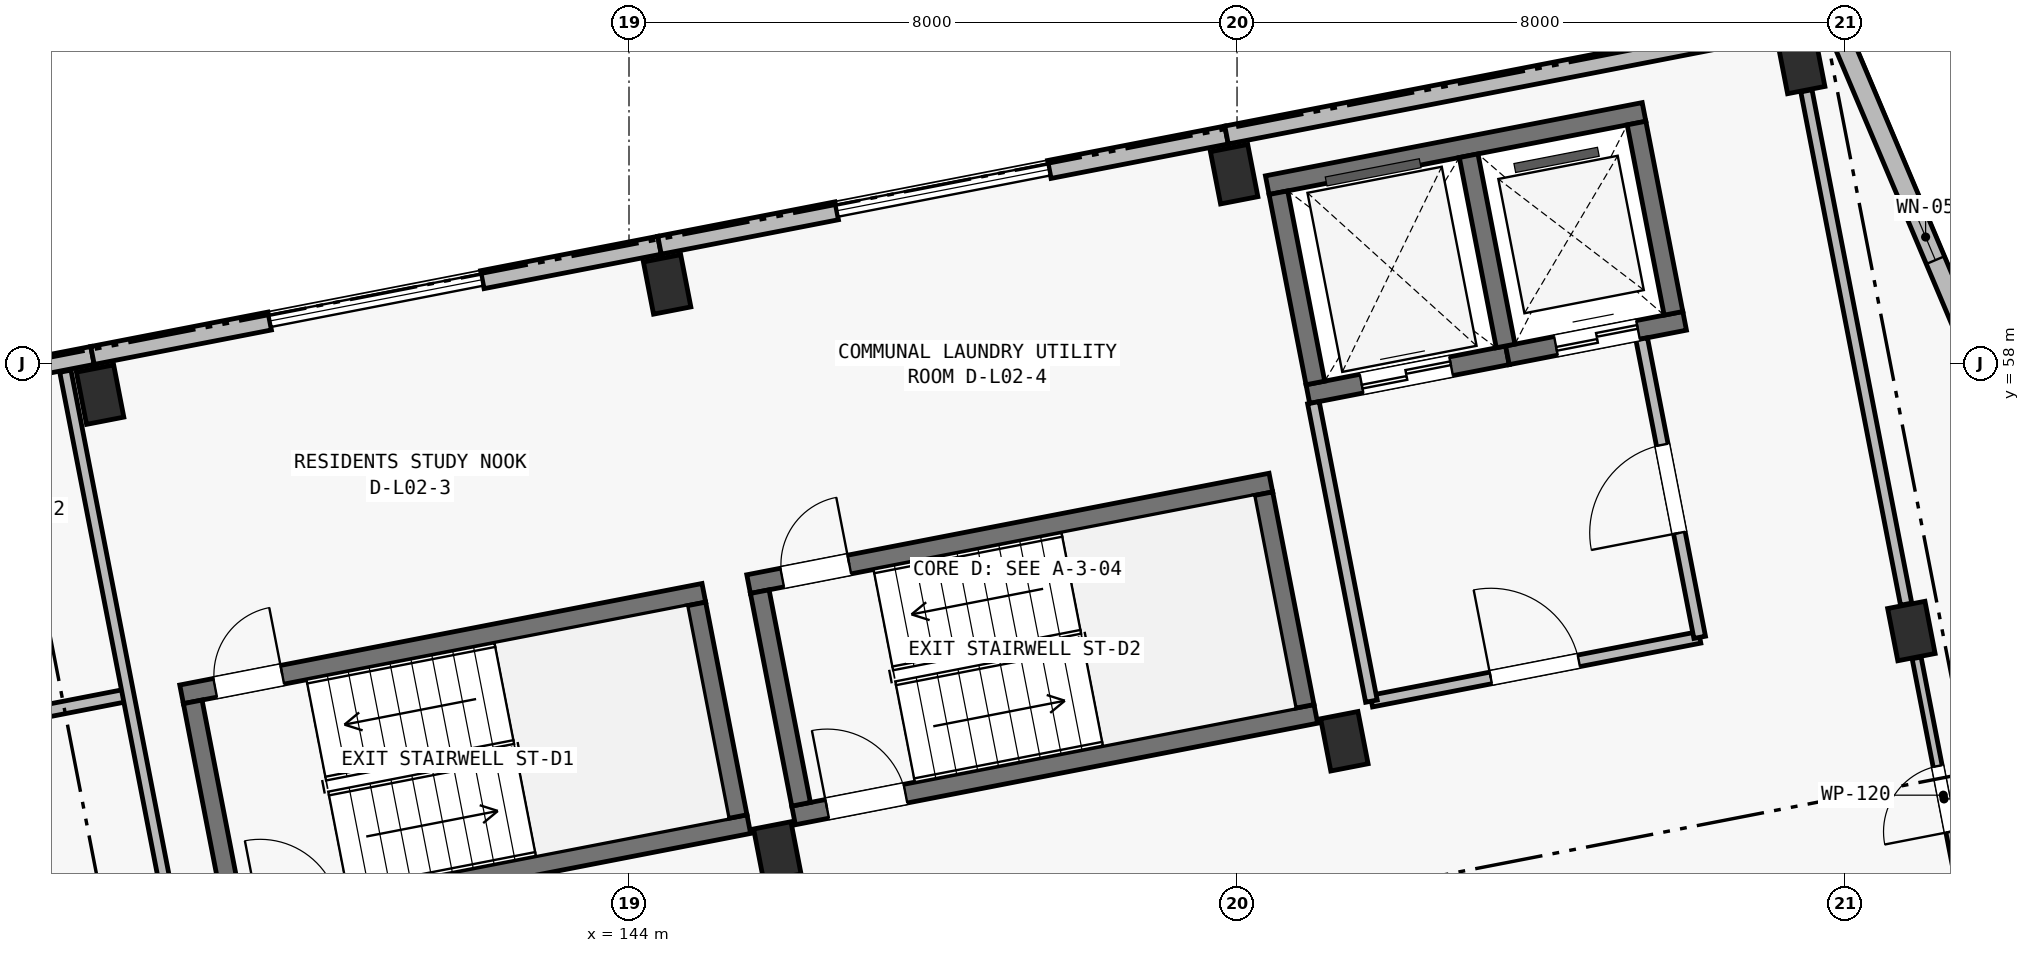
"""IFC4 building model, lengths in metres.
Left out: names, types, materials, properties, quantities, classifications, styles, units other than length and angle.
Written with IfcOpenShell. Run it as: python <this file> out.ifc"""

import sys

from ifc_helpers import new_model, si_unit, direction, frame, frame_2d, origin, origin_2d, place, context, subcontext, project, spatial, rectangle, extrude, element, fill, save


model = new_model("IFC4")
c1 = context("Model", 3, precision=1e-05, world=origin(), true_north=direction((0.0, 1.0)))
c2 = subcontext(c1, "Body", "Model", "MODEL_VIEW")
j1 = project(units=[si_unit("LENGTHUNIT", "METRE"), si_unit("PLANEANGLEUNIT", "RADIAN")], contexts=[c1])
p1 = place(None, origin())
s1 = spatial("IfcSite", under=j1, at=p1, CompositionType="ELEMENT")
p2 = place(p1, origin())
s2 = spatial("IfcBuilding", under=s1, at=p2, CompositionType="ELEMENT")
p3 = place(p2, frame((0.0, 0.0, 8.4)))
s3 = spatial("IfcBuildingStorey", under=s2, at=p3, CompositionType="ELEMENT", Elevation=8.4)
for number, where, z_axis, x_axis in (
    (1, (137.041, 57.59, 0.0), (0.0, 0.0, 1.0), (0.982, 0.191, 0.0)),
    (2, (145.952, 51.58, 0.0), (0.0, 0.0, 1.0), (0.982, 0.191, 0.0)),
    (3, (144.502, 59.041, 0.0), (0.0, 0.0, 1.0), (0.982, 0.191, 0.0)),
    (4, (153.412, 53.03, 0.0), (0.0, 0.0, 1.0), (0.982, 0.191, 0.0)),
    (5, (151.962, 60.491, 0.0), (0.0, 0.0, 1.0), (0.982, 0.191, 0.0)),
    (6, (160.873, 54.48, 0.0), (0.0, 0.0, 1.0), (0.982, 0.191, 0.0)),
    (7, (159.422, 61.941, 0.0), (0.0, 0.0, 1.0), (0.982, 0.191, 0.0)),
):
    element("IfcColumn", number, at=place(p3, frame(where, z_axis=z_axis, x_axis=x_axis)), inside=s3, PredefinedType="COLUMN", context=c2, shape_type="SweptSolid", body=[
        extrude(rectangle(XDim=0.5, YDim=0.7, at=origin_2d()), origin(), (0.0, 0.0, 1.0), 3.25),
    ])
p4 = place(p3, frame((152.397, 60.346, 0.0), z_axis=(0.0, 0.0, 1.0), x_axis=(0.981635261308, 0.190767433692, 0.0)))
e8 = element("IfcWall", 8, at=p4, inside=s3, PredefinedType="SHEAR", context=c2, shape_type="SweptSolid", body=[
    extrude(rectangle(XDim=5.05, YDim=0.25, at=frame_2d((2.525, 0.0))), origin(), (0.0, 0.0, 1.0), 3.25),
])
p5 = place(p3, frame((152.932, 57.598, 0.0), z_axis=(0.0, 0.0, 1.0), x_axis=(0.981636759622, 0.190759723627, 0.0)))
e9 = element("IfcWall", 9, at=p5, inside=s3, PredefinedType="SHEAR", context=c2, shape_type="SweptSolid", body=[
    extrude(rectangle(XDim=2.675, YDim=0.25, at=frame_2d((1.337, 0.0))), origin(), (0.0, 0.0, 1.0), 3.25),
])
p6 = place(p5, frame((0.72, 0.0, 0.0)))
e10 = element("IfcOpeningElement", 10, at=p6, cuts=e9, PredefinedType="OPENING", context=c2, shape_type="SweptSolid", body=[
    extrude(rectangle(XDim=1.2, YDim=2.2, at=frame_2d((0.6, 1.1))), frame((0.0, 0.14, 0.0), z_axis=(0.0, -1.0, 0.0), x_axis=(1.0, 0.0, 0.0)), (0.0, 0.0, 1.0), 0.28),
])
p7 = place(p3, frame((155.558, 58.108, 0.0), z_axis=(0.0, 0.0, 1.0), x_axis=(0.981633573872, 0.190776116556, 0.0)))
e11 = element("IfcWall", 11, at=p7, inside=s3, PredefinedType="SHEAR", context=c2, shape_type="SweptSolid", body=[
    extrude(rectangle(XDim=2.375, YDim=0.25, at=frame_2d((1.188, 0.0))), origin(), (0.0, 0.0, 1.0), 3.25),
])
p8 = place(p7, frame((0.65, 0.0, 0.0)))
e12 = element("IfcOpeningElement", 12, at=p8, cuts=e11, PredefinedType="OPENING", context=c2, shape_type="SweptSolid", body=[
    extrude(rectangle(XDim=1.1, YDim=2.15, at=frame_2d((0.55, 1.075))), frame((0.0, 0.14, 0.0), z_axis=(0.0, -1.0, 0.0), x_axis=(1.0, 0.0, 0.0)), (0.0, 0.0, 1.0), 0.28),
])
for number, where, z_axis, x_axis in (
    (13, (153.031, 57.744, 0.0), (0.0, 0.0, 1.0), (-0.191, 0.982, 0.0)),
    (14, (155.534, 58.231, 0.0), (0.0, 0.0, 1.0), (-0.191, 0.982, 0.0)),
    (15, (157.742, 58.66, 0.0), (0.0, 0.0, 1.0), (-0.191, 0.982, 0.0)),
):
    element("IfcWall", number, at=place(p3, frame(where, z_axis=z_axis, x_axis=x_axis)), inside=s3, PredefinedType="SHEAR", context=c2, shape_type="SweptSolid", body=[
        extrude(rectangle(XDim=2.55, YDim=0.25, at=frame_2d((1.275, 0.0))), origin(), (0.0, 0.0, 1.0), 3.25),
    ])
p9 = place(p3, frame((138.113, 53.647, 0.0), z_axis=(0.0, 0.0, 1.0), x_axis=(0.981626097708, 0.19081458094, 0.0)))
e16 = element("IfcWall", 16, at=p9, inside=s3, PredefinedType="SHEAR", context=c2, shape_type="SweptSolid", body=[
    extrude(rectangle(XDim=7.0, YDim=0.25, at=frame_2d((3.5, 0.0))), origin(), (0.0, 0.0, 1.0), 3.25),
])
p10 = place(p9, frame((0.45, 0.0, 0.0)))
e17 = element("IfcOpeningElement", 17, at=p10, cuts=e16, PredefinedType="OPENING", context=c2, shape_type="SweptSolid", body=[
    extrude(rectangle(XDim=0.9, YDim=2.1, at=frame_2d((0.45, 1.05))), frame((0.0, 0.14, 0.0), z_axis=(0.0, -1.0, 0.0), x_axis=(1.0, 0.0, 0.0)), (0.0, 0.0, 1.0), 0.28),
])
p11 = place(p3, frame((138.705, 50.604, 0.0), z_axis=(0.0, 0.0, 1.0), x_axis=(0.981626097708, 0.19081458094, 0.0)))
e18 = element("IfcWall", 18, at=p11, inside=s3, PredefinedType="SHEAR", context=c2, shape_type="SweptSolid", body=[
    extrude(rectangle(XDim=7.0, YDim=0.25, at=frame_2d((3.5, 0.0))), origin(), (0.0, 0.0, 1.0), 3.25),
])
p12 = place(p11, frame((0.45, 0.0, 0.0)))
e19 = element("IfcOpeningElement", 19, at=p12, cuts=e18, PredefinedType="OPENING", context=c2, shape_type="SweptSolid", body=[
    extrude(rectangle(XDim=1.05, YDim=2.15, at=frame_2d((0.525, 1.075))), frame((0.0, 0.14, 0.0), z_axis=(0.0, -1.0, 0.0), x_axis=(1.0, 0.0, 0.0)), (0.0, 0.0, 1.0), 0.28),
])
p13 = place(p3, frame((138.804, 50.751, 0.0), z_axis=(0.0, 0.0, 1.0), x_axis=(-0.190858194834, 0.981617618762, 0.0)))
e20 = element("IfcWall", 20, at=p13, inside=s3, PredefinedType="SHEAR", context=c2, shape_type="SweptSolid", body=[
    extrude(rectangle(XDim=2.85, YDim=0.25, at=frame_2d((1.425, 0.0))), origin(), (0.0, 0.0, 1.0), 3.25),
])
p14 = place(p3, frame((145.43, 52.039, 0.0), z_axis=(0.0, 0.0, 1.0), x_axis=(-0.190842147128, 0.981620738819, 0.0)))
e21 = element("IfcWall", 21, at=p14, inside=s3, PredefinedType="SHEAR", context=c2, shape_type="SweptSolid", body=[
    extrude(rectangle(XDim=2.85, YDim=0.25, at=frame_2d((1.425, 0.0))), origin(), (0.0, 0.0, 1.0), 3.25),
])
p15 = place(p3, frame((145.574, 55.098, 0.0), z_axis=(0.0, 0.0, 1.0), x_axis=(0.981626097708, 0.19081458094, 0.0)))
e22 = element("IfcWall", 22, at=p15, inside=s3, PredefinedType="SHEAR", context=c2, shape_type="SweptSolid", body=[
    extrude(rectangle(XDim=7.0, YDim=0.25, at=frame_2d((3.5, 0.0))), origin(), (0.0, 0.0, 1.0), 3.25),
])
p16 = place(p15, frame((0.45, 0.0, 0.0)))
e23 = element("IfcOpeningElement", 23, at=p16, cuts=e22, PredefinedType="OPENING", context=c2, shape_type="SweptSolid", body=[
    extrude(rectangle(XDim=0.9, YDim=2.1, at=frame_2d((0.45, 1.05))), frame((0.0, 0.14, 0.0), z_axis=(0.0, -1.0, 0.0), x_axis=(1.0, 0.0, 0.0)), (0.0, 0.0, 1.0), 0.28),
])
p17 = place(p3, frame((146.165, 52.054, 0.0), z_axis=(0.0, 0.0, 1.0), x_axis=(0.981627367538, 0.190808048312, 0.0)))
e24 = element("IfcWall", 24, at=p17, inside=s3, PredefinedType="SHEAR", context=c2, shape_type="SweptSolid", body=[
    extrude(rectangle(XDim=7.0, YDim=0.25, at=frame_2d((3.5, 0.0))), origin(), (0.0, 0.0, 1.0), 3.25),
])
p18 = place(p17, frame((0.45, 0.0, 0.0)))
e25 = element("IfcOpeningElement", 25, at=p18, cuts=e24, PredefinedType="OPENING", context=c2, shape_type="SweptSolid", body=[
    extrude(rectangle(XDim=1.05, YDim=2.15, at=frame_2d((0.525, 1.075))), frame((0.0, 0.14, 0.0), z_axis=(0.0, -1.0, 0.0), x_axis=(1.0, 0.0, 0.0)), (0.0, 0.0, 1.0), 0.28),
])
for number, where, z_axis, x_axis in (
    (26, (146.264, 52.201, 0.0), (0.0, 0.0, 1.0), (-0.191, 0.982, 0.0)),
    (27, (152.89, 53.489, 0.0), (0.0, 0.0, 1.0), (-0.191, 0.982, 0.0)),
):
    element("IfcWall", number, at=place(p3, frame(where, z_axis=z_axis, x_axis=x_axis)), inside=s3, PredefinedType="SHEAR", context=c2, shape_type="SweptSolid", body=[
        extrude(rectangle(XDim=2.85, YDim=0.25, at=frame_2d((1.425, 0.0))), origin(), (0.0, 0.0, 1.0), 3.25),
    ])
p19 = place(p3, frame((129.481, 56.656, 0.0), z_axis=(0.0, 0.0, 1.0), x_axis=(0.981626422232, 0.190812911449, 0.0)))
e28 = element("IfcWall", 28, at=p19, inside=s3, PredefinedType="SOLIDWALL", context=c2, shape_type="SweptSolid", body=[
    extrude(rectangle(XDim=7.6, YDim=0.24, at=frame_2d((3.8, 0.0))), origin(), (0.0, 0.0, 1.0), 3.0),
])
p20 = place(p19, frame((0.934, 0.0, 0.44)))
e29 = element("IfcOpeningElement", 29, at=p20, cuts=e28, PredefinedType="OPENING", context=c2, shape_type="SweptSolid", body=[
    extrude(rectangle(XDim=0.62, YDim=2.28, at=frame_2d((0.31, 1.14))), frame((0.0, 0.135, 0.0), z_axis=(0.0, -1.0, 0.0), x_axis=(1.0, 0.0, 0.0)), (0.0, 0.0, 1.0), 0.27),
])
p21 = place(p19, frame((5.506, 0.0, 0.5)))
e30 = element("IfcOpeningElement", 30, at=p21, cuts=e28, PredefinedType="OPENING", context=c2, shape_type="SweptSolid", body=[
    extrude(rectangle(XDim=0.7, YDim=2.36, at=frame_2d((0.35, 1.18))), frame((0.0, 0.135, 0.0), z_axis=(0.0, -1.0, 0.0), x_axis=(1.0, 0.0, 0.0)), (0.0, 0.0, 1.0), 0.27),
])
for number, where, z_axis, x_axis in (
    (31, (136.941, 58.106, 0.0), (0.0, 0.0, 1.0), (0.982, 0.191, 0.0)),
    (32, (142.07, 59.103, 0.0), (0.0, 0.0, 1.0), (0.982, 0.191, 0.0)),
):
    element("IfcWall", number, at=place(p3, frame(where, z_axis=z_axis, x_axis=x_axis)), inside=s3, PredefinedType="SOLIDWALL", context=c2, shape_type="SweptSolid", body=[
        extrude(rectangle(XDim=2.375, YDim=0.24, at=frame_2d((1.188, 0.0))), origin(), (0.0, 0.0, 1.0), 3.0),
    ])
p22 = place(p3, frame((144.401, 59.556, 0.0), z_axis=(0.0, 0.0, 1.0), x_axis=(0.981633573872, 0.190776116556, 0.0)))
e33 = element("IfcWall", 33, at=p22, inside=s3, PredefinedType="SOLIDWALL", context=c2, shape_type="SweptSolid", body=[
    extrude(rectangle(XDim=2.375, YDim=0.24, at=frame_2d((1.188, 0.0))), origin(), (0.0, 0.0, 1.0), 3.0),
])
p23 = place(p3, frame((149.531, 60.553, 0.0), z_axis=(0.0, 0.0, 1.0), x_axis=(0.98161057432, 0.190894422087, 0.0)))
e34 = element("IfcWall", 34, at=p23, inside=s3, PredefinedType="SOLIDWALL", context=c2, shape_type="SweptSolid", body=[
    extrude(rectangle(XDim=2.375, YDim=0.24, at=frame_2d((1.188, 0.0))), origin(), (0.0, 0.0, 1.0), 3.0),
])
p24 = place(p3, frame((151.862, 61.006, 0.0), z_axis=(0.0, 0.0, 1.0), x_axis=(0.981627273155, 0.190808533872, 0.0)))
e35 = element("IfcWall", 35, at=p24, inside=s3, PredefinedType="SOLIDWALL", context=c2, shape_type="SweptSolid", body=[
    extrude(rectangle(XDim=8.125, YDim=0.24, at=frame_2d((4.062, 0.0))), origin(), (0.0, 0.0, 1.0), 3.0),
])
p25 = place(p24, frame((6.525, 0.0, 0.45)))
e36 = element("IfcOpeningElement", 36, at=p25, cuts=e35, PredefinedType="OPENING", context=c2, shape_type="SweptSolid", body=[
    extrude(rectangle(XDim=0.75, YDim=2.32, at=frame_2d((0.375, 1.16))), frame((0.0, 0.135, 0.0), z_axis=(0.0, -1.0, 0.0), x_axis=(1.0, 0.0, 0.0)), (0.0, 0.0, 1.0), 0.27),
])
p26 = place(p3, frame((159.837, 62.556, 0.0), z_axis=(0.0, 0.0, 1.0), x_axis=(0.389225507936, -0.921142499276, 0.0)))
e37 = element("IfcWall", 37, at=p26, inside=s3, PredefinedType="SOLIDWALL", context=c2, shape_type="SweptSolid", body=[
    extrude(rectangle(XDim=17.91, YDim=0.26, at=frame_2d((8.955, 0.0))), origin(), (0.0, 0.0, 1.0), 3.0),
])
p27 = place(p26, frame((2.81, 0.0, 0.45)))
e38 = element("IfcOpeningElement", 38, at=p27, cuts=e37, PredefinedType="OPENING", context=c2, shape_type="SweptSolid", body=[
    extrude(rectangle(XDim=0.66, YDim=2.32, at=frame_2d((0.33, 1.16))), frame((0.0, 0.145, 0.0), z_axis=(0.0, -1.0, 0.0), x_axis=(1.0, 0.0, 0.0)), (0.0, 0.0, 1.0), 0.29),
])
p28 = place(p26, frame((14.3, 0.0, 0.52)))
e39 = element("IfcOpeningElement", 39, at=p28, cuts=e37, PredefinedType="OPENING", context=c2, shape_type="SweptSolid", body=[
    extrude(rectangle(XDim=0.8, YDim=2.3, at=frame_2d((0.4, 1.15))), frame((0.0, 0.145, 0.0), z_axis=(0.0, -1.0, 0.0), x_axis=(1.0, 0.0, 0.0)), (0.0, 0.0, 1.0), 0.29),
])
p29 = place(p3, frame((153.768, 53.558, 0.0), z_axis=(0.0, 0.0, 1.0), x_axis=(0.981624918225, 0.190820648566, 0.0)))
e40 = element("IfcWall", 40, at=p29, inside=s3, PredefinedType="PARTITIONING", context=c2, shape_type="SweptSolid", body=[
    extrude(rectangle(XDim=4.4, YDim=0.155, at=frame_2d((2.2, 0.0))), origin(), (0.0, 0.0, 1.0), 2.97),
])
p30 = place(p29, frame((1.6, 0.0, 0.0)))
e41 = element("IfcOpeningElement", 41, at=p30, cuts=e40, PredefinedType="OPENING", context=c2, shape_type="SweptSolid", body=[
    extrude(rectangle(XDim=1.18, YDim=2.15, at=frame_2d((0.59, 1.075))), frame((0.0, 0.093, 0.0), z_axis=(0.0, -1.0, 0.0), x_axis=(1.0, 0.0, 0.0)), (0.0, 0.0, 1.0), 0.185),
])
p31 = place(p3, frame((153.768, 53.558, 0.0), z_axis=(0.0, 0.0, 1.0), x_axis=(-0.19085495634, 0.981618248425, 0.0)))
e42 = element("IfcWall", 42, at=p31, inside=s3, PredefinedType="PARTITIONING", context=c2, shape_type="SweptSolid", body=[
    extrude(rectangle(XDim=4.0, YDim=0.155, at=frame_2d((2.0, 0.0))), origin(), (0.0, 0.0, 1.0), 2.97),
])
p32 = place(p3, frame((158.087, 54.397, 0.0), z_axis=(0.0, 0.0, 1.0), x_axis=(-0.190796144009, 0.981629681413, 0.0)))
e43 = element("IfcWall", 43, at=p32, inside=s3, PredefinedType="PARTITIONING", context=c2, shape_type="SweptSolid", body=[
    extrude(rectangle(XDim=4.0, YDim=0.155, at=frame_2d((2.0, 0.0))), origin(), (0.0, 0.0, 1.0), 2.97),
])
p33 = place(p32, frame((1.4, 0.0, 0.0)))
e44 = element("IfcOpeningElement", 44, at=p33, cuts=e43, PredefinedType="OPENING", context=c2, shape_type="SweptSolid", body=[
    extrude(rectangle(XDim=1.18, YDim=2.15, at=frame_2d((0.59, 1.075))), frame((0.0, 0.093, 0.0), z_axis=(0.0, -1.0, 0.0), x_axis=(1.0, 0.0, 0.0)), (0.0, 0.0, 1.0), 0.185),
])
p34 = place(p3, frame((161.643, 50.515, 0.0), z_axis=(0.0, 0.0, 1.0), x_axis=(-0.190805731561, 0.981627817864, 0.0)))
e45 = element("IfcWall", 45, at=p34, inside=s3, PredefinedType="PARTITIONING", context=c2, shape_type="SweptSolid", body=[
    extrude(rectangle(XDim=3.68, YDim=0.12, at=frame_2d((1.84, 0.0))), origin(), (0.0, 0.0, 1.0), 2.5),
])
p35 = place(p34, frame((1.35, 0.0, 0.0)))
e46 = element("IfcOpeningElement", 46, at=p35, cuts=e45, PredefinedType="OPENING", context=c2, shape_type="SweptSolid", body=[
    extrude(rectangle(XDim=0.88, YDim=2.1, at=frame_2d((0.44, 1.05))), frame((0.0, 0.075, 0.0), z_axis=(0.0, -1.0, 0.0), x_axis=(1.0, 0.0, 0.0)), (0.0, 0.0, 1.0), 0.15),
])
p36 = place(p3, frame((160.804, 54.834, 0.0), z_axis=(0.0, 0.0, 1.0), x_axis=(-0.190804123115, 0.981628130507, 0.0)))
e47 = element("IfcWall", 47, at=p36, inside=s3, PredefinedType="PARTITIONING", context=c2, shape_type="SweptSolid", body=[
    extrude(rectangle(XDim=6.88, YDim=0.15, at=frame_2d((3.44, 0.0))), origin(), (0.0, 0.0, 1.0), 2.5),
])
p37 = place(p3, frame((134.065, 52.988, 0.0), z_axis=(0.0, 0.0, 1.0), x_axis=(0.981629173664, 0.190798756314, 0.0)))
e48 = element("IfcWall", 48, at=p37, inside=s3, PredefinedType="PLUMBINGWALL", context=c2, shape_type="SweptSolid", body=[
    extrude(rectangle(XDim=3.41, YDim=0.165, at=frame_2d((1.705, 0.0))), origin(), (0.0, 0.0, 1.0), 2.97),
])
p38 = place(p37, frame((1.295, 0.0, 0.0)))
e49 = element("IfcOpeningElement", 49, at=p38, cuts=e48, PredefinedType="OPENING", context=c2, shape_type="SweptSolid", body=[
    extrude(rectangle(XDim=0.82, YDim=2.08, at=frame_2d((0.41, 1.04))), frame((0.0, 0.097, 0.0), z_axis=(0.0, -1.0, 0.0), x_axis=(1.0, 0.0, 0.0)), (0.0, 0.0, 1.0), 0.195),
])
p39 = place(p3, frame((138.467, 48.21, 0.0), z_axis=(0.0, 0.0, 1.0), x_axis=(-0.190814044018, 0.981626202078, 0.0)))
e50 = element("IfcWall", 50, at=p39, inside=s3, PredefinedType="PARTITIONING", context=c2, shape_type="SweptSolid", body=[
    extrude(rectangle(XDim=9.87, YDim=0.15, at=frame_2d((4.935, 0.0))), origin(), (0.0, 0.0, 1.0), 2.97),
])
p40 = place(p27, origin())
e51 = element("IfcWindow", 51, at=p40, inside=s3, PartitioningType="SINGLE_PANEL", PredefinedType="WINDOW", context=c2, shape_type="SweptSolid", body=[
    extrude(rectangle(XDim=0.66, YDim=2.32, at=frame_2d((0.33, 1.16))), frame((0.0, 0.03, 0.0), z_axis=(0.0, -1.0, 0.0), x_axis=(1.0, 0.0, 0.0)), (0.0, 0.0, 1.0), 0.06),
])
fill(e38, e51)
p41 = place(p30, origin())
e52 = element("IfcDoor", 52, at=p41, inside=s3, OperationType="SINGLE_SWING_LEFT", PredefinedType="DOOR", context=c2, shape_type="SweptSolid", body=[
    extrude(rectangle(XDim=1.18, YDim=2.15, at=frame_2d((0.59, 1.075))), frame((0.0, 0.025, 0.0), z_axis=(0.0, -1.0, 0.0), x_axis=(1.0, 0.0, 0.0)), (0.0, 0.0, 1.0), 0.05),
])
fill(e41, e52)
p42 = place(p33, origin())
e53 = element("IfcDoor", 53, at=p42, inside=s3, OperationType="SINGLE_SWING_LEFT", PredefinedType="DOOR", context=c2, shape_type="SweptSolid", body=[
    extrude(rectangle(XDim=1.18, YDim=2.15, at=frame_2d((0.59, 1.075))), frame((0.0, 0.025, 0.0), z_axis=(0.0, -1.0, 0.0), x_axis=(1.0, 0.0, 0.0)), (0.0, 0.0, 1.0), 0.05),
])
fill(e44, e53)
p43 = place(p35, origin())
e54 = element("IfcDoor", 54, at=p43, inside=s3, OperationType="SINGLE_SWING_LEFT", PredefinedType="DOOR", context=c2, shape_type="SweptSolid", body=[
    extrude(rectangle(XDim=0.88, YDim=2.1, at=frame_2d((0.44, 1.05))), frame((0.0, 0.025, 0.0), z_axis=(0.0, -1.0, 0.0), x_axis=(1.0, 0.0, 0.0)), (0.0, 0.0, 1.0), 0.05),
])
fill(e46, e54)
p44 = place(p10, origin())
e55 = element("IfcDoor", 55, at=p44, inside=s3, OperationType="SINGLE_SWING_RIGHT", PredefinedType="DOOR", context=c2, shape_type="SweptSolid", body=[
    extrude(rectangle(XDim=0.9, YDim=2.1, at=frame_2d((0.45, 1.05))), frame((0.0, 0.025, 0.0), z_axis=(0.0, -1.0, 0.0), x_axis=(1.0, 0.0, 0.0)), (0.0, 0.0, 1.0), 0.05),
])
fill(e17, e55)
p45 = place(p18, origin())
e56 = element("IfcDoor", 56, at=p45, inside=s3, OperationType="SINGLE_SWING_LEFT", PredefinedType="DOOR", context=c2, shape_type="SweptSolid", body=[
    extrude(rectangle(XDim=1.05, YDim=2.15, at=frame_2d((0.525, 1.075))), frame((0.0, 0.025, 0.0), z_axis=(0.0, -1.0, 0.0), x_axis=(1.0, 0.0, 0.0)), (0.0, 0.0, 1.0), 0.05),
])
fill(e25, e56)
p46 = place(p16, origin())
e57 = element("IfcDoor", 57, at=p46, inside=s3, OperationType="SINGLE_SWING_RIGHT", PredefinedType="DOOR", context=c2, shape_type="SweptSolid", body=[
    extrude(rectangle(XDim=0.9, YDim=2.1, at=frame_2d((0.45, 1.05))), frame((0.0, 0.025, 0.0), z_axis=(0.0, -1.0, 0.0), x_axis=(1.0, 0.0, 0.0)), (0.0, 0.0, 1.0), 0.05),
])
fill(e23, e57)
p47 = place(p6, origin())
e58 = element("IfcDoor", 58, at=p47, inside=s3, OperationType="DOUBLE_DOOR_SLIDING", PredefinedType="DOOR", context=c2, shape_type="SweptSolid", body=[
    extrude(rectangle(XDim=1.2, YDim=2.2, at=frame_2d((0.6, 1.1))), frame((0.0, 0.025, 0.0), z_axis=(0.0, -1.0, 0.0), x_axis=(1.0, 0.0, 0.0)), (0.0, 0.0, 1.0), 0.05),
])
fill(e10, e58)
p48 = place(p8, origin())
e59 = element("IfcDoor", 59, at=p48, inside=s3, OperationType="DOUBLE_DOOR_SLIDING", PredefinedType="DOOR", context=c2, shape_type="SweptSolid", body=[
    extrude(rectangle(XDim=1.1, YDim=2.15, at=frame_2d((0.55, 1.075))), frame((0.0, 0.025, 0.0), z_axis=(0.0, -1.0, 0.0), x_axis=(1.0, 0.0, 0.0)), (0.0, 0.0, 1.0), 0.05),
])
fill(e12, e59)
save(model, sys.argv[1])
